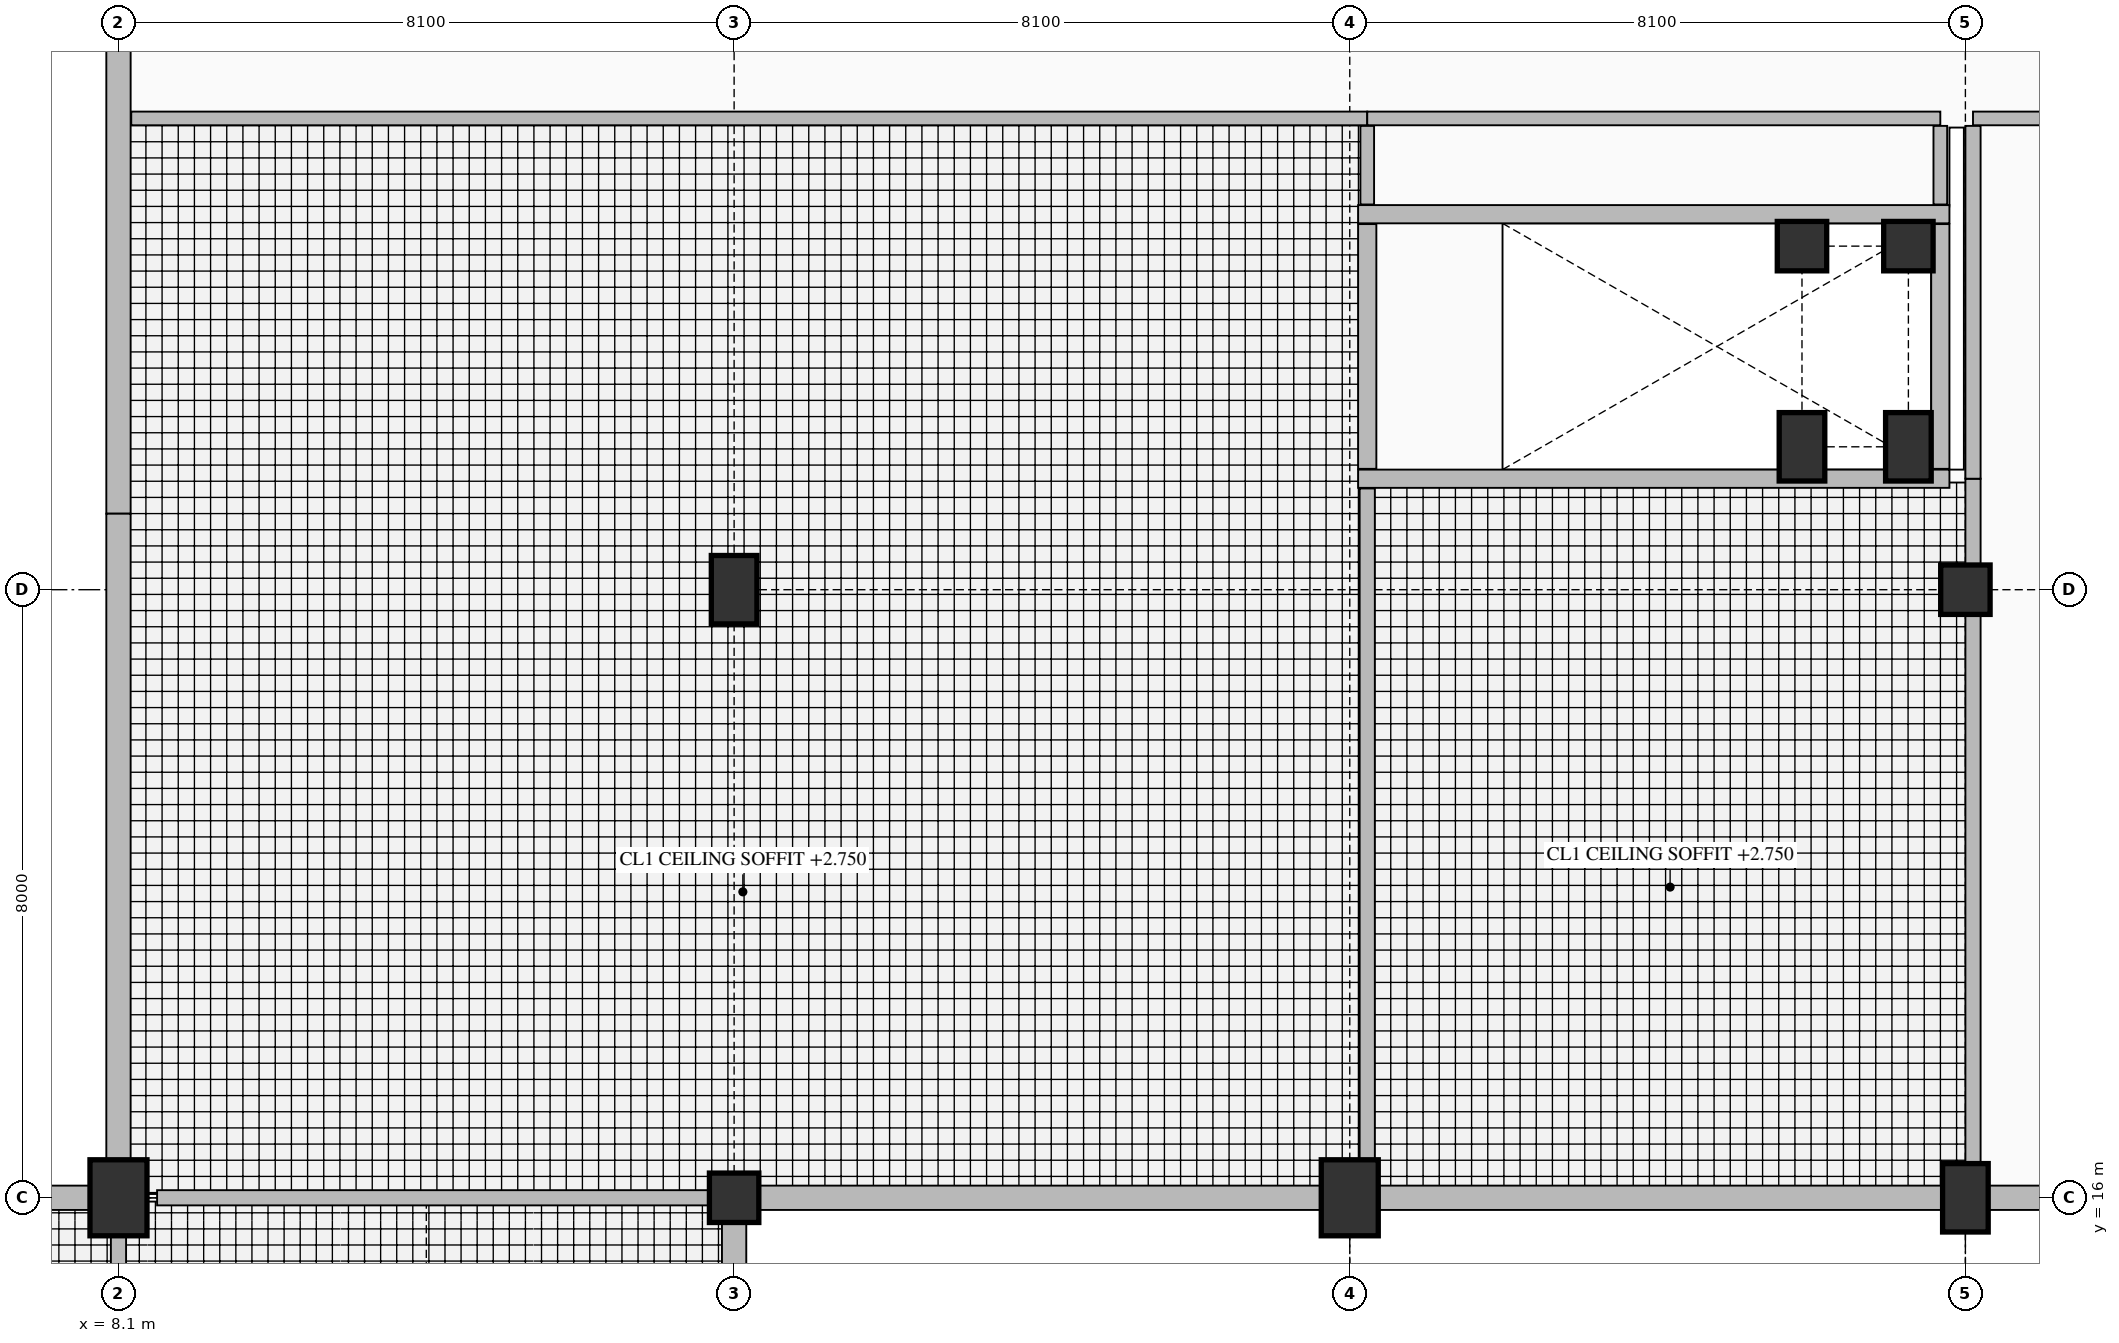
"""IFC4 building model, lengths in metres.
Left out: names, types, materials, properties, quantities, classifications, styles, units other than length and angle.
Written with IfcOpenShell. Run it as: python <this file> out.ifc"""

import sys

from ifc_helpers import new_model, si_unit, direction, frame, frame_2d, origin, origin_2d, place, context, subcontext, project, spatial, rectangle, extrude, element, fill, save


model = new_model("IFC4")
c1 = context("Model", 3, precision=1e-05, world=origin(), true_north=direction((0.0, 1.0)))
c2 = subcontext(c1, "Body", "Model", "MODEL_VIEW")
j1 = project(units=[si_unit("LENGTHUNIT", "METRE"), si_unit("PLANEANGLEUNIT", "RADIAN")], contexts=[c1])
p1 = place(None, origin())
s1 = spatial("IfcSite", under=j1, at=p1, CompositionType="ELEMENT")
p2 = place(p1, origin())
s2 = spatial("IfcBuilding", under=s1, at=p2, CompositionType="ELEMENT")
p3 = place(p2, origin())
s3 = spatial("IfcBuildingStorey", under=s2, at=p3, CompositionType="ELEMENT", Elevation=0.0)
p4 = place(p3, frame((8.1, 16.0, 0.0), z_axis=(0.0, 0.0, 1.0), x_axis=(1.0, 0.0, 0.0)))
e1 = element("IfcColumn", 1, at=p4, inside=s3, PredefinedType="COLUMN", context=c2, shape_type="SweptSolid", body=[
    extrude(rectangle(XDim=0.75, YDim=1.0, at=origin_2d()), origin(), (0.0, 0.0, 1.0), 5.4),
])
p5 = place(p3, frame((16.2, 16.0, 0.0), z_axis=(0.0, 0.0, 1.0), x_axis=(1.0, 0.0, 0.0)))
e2 = element("IfcColumn", 2, at=p5, inside=s3, PredefinedType="COLUMN", context=c2, shape_type="SweptSolid", body=[
    extrude(rectangle(XDim=0.65, YDim=0.65, at=origin_2d()), origin(), (0.0, 0.0, 1.0), 5.4),
])
p6 = place(p3, frame((16.2, 24.0, 0.0), z_axis=(0.0, 0.0, 1.0), x_axis=(1.0, 0.0, 0.0)))
e3 = element("IfcColumn", 3, at=p6, inside=s3, PredefinedType="COLUMN", context=c2, shape_type="SweptSolid", body=[
    extrude(rectangle(XDim=0.6, YDim=0.9, at=origin_2d()), origin(), (0.0, 0.0, 1.0), 5.4),
])
p7 = place(p3, frame((24.3, 16.0, 0.0), z_axis=(0.0, 0.0, 1.0), x_axis=(1.0, 0.0, 0.0)))
e4 = element("IfcColumn", 4, at=p7, inside=s3, PredefinedType="COLUMN", context=c2, shape_type="SweptSolid", body=[
    extrude(rectangle(XDim=0.75, YDim=1.0, at=origin_2d()), origin(), (0.0, 0.0, 1.0), 5.4),
])
p8 = place(p3, frame((30.25, 25.88, 0.0), z_axis=(0.0, 0.0, 1.0), x_axis=(1.0, 0.0, 0.0)))
e5 = element("IfcColumn", 5, at=p8, inside=s3, PredefinedType="COLUMN", context=c2, shape_type="SweptSolid", body=[
    extrude(rectangle(XDim=0.6, YDim=0.9, at=origin_2d()), origin(), (0.0, 0.0, 1.0), 5.4),
])
p9 = place(p3, frame((30.25, 28.52, 0.0), z_axis=(0.0, 0.0, 1.0), x_axis=(1.0, 0.0, 0.0)))
e6 = element("IfcColumn", 6, at=p9, inside=s3, PredefinedType="COLUMN", context=c2, shape_type="SweptSolid", body=[
    extrude(rectangle(XDim=0.65, YDim=0.65, at=origin_2d()), origin(), (0.0, 0.0, 1.0), 5.4),
])
p10 = place(p3, frame((31.65, 25.88, 0.0), z_axis=(0.0, 0.0, 1.0), x_axis=(1.0, 0.0, 0.0)))
e7 = element("IfcColumn", 7, at=p10, inside=s3, PredefinedType="COLUMN", context=c2, shape_type="SweptSolid", body=[
    extrude(rectangle(XDim=0.6, YDim=0.9, at=origin_2d()), origin(), (0.0, 0.0, 1.0), 5.4),
])
p11 = place(p3, frame((31.65, 28.52, 0.0), z_axis=(0.0, 0.0, 1.0), x_axis=(1.0, 0.0, 0.0)))
e8 = element("IfcColumn", 8, at=p11, inside=s3, PredefinedType="COLUMN", context=c2, shape_type="SweptSolid", body=[
    extrude(rectangle(XDim=0.65, YDim=0.65, at=origin_2d()), origin(), (0.0, 0.0, 1.0), 5.4),
])
p12 = place(p3, frame((32.4, 16.0, 0.0), z_axis=(0.0, 0.0, 1.0), x_axis=(1.0, 0.0, 0.0)))
e9 = element("IfcColumn", 9, at=p12, inside=s3, PredefinedType="COLUMN", context=c2, shape_type="SweptSolid", body=[
    extrude(rectangle(XDim=0.6, YDim=0.9, at=origin_2d()), origin(), (0.0, 0.0, 1.0), 5.4),
])
p13 = place(p3, frame((32.4, 24.0, 0.0), z_axis=(0.0, 0.0, 1.0), x_axis=(1.0, 0.0, 0.0)))
e10 = element("IfcColumn", 10, at=p13, inside=s3, PredefinedType="COLUMN", context=c2, shape_type="SweptSolid", body=[
    extrude(rectangle(XDim=0.65, YDim=0.65, at=origin_2d()), origin(), (0.0, 0.0, 1.0), 5.4),
])
p14 = place(p3, frame((16.2, 0.0, 0.0), z_axis=(0.0, 0.0, 1.0), x_axis=(0.0, 1.0, 0.0)))
e11 = element("IfcWall", 11, at=p14, inside=s3, PredefinedType="SOLIDWALL", context=c2, shape_type="SweptSolid", body=[
    extrude(rectangle(XDim=16.0, YDim=0.32, at=frame_2d((8.0, 0.0))), origin(), (0.0, 0.0, 1.0), 4.512),
])
p15 = place(p14, frame((3.38, 0.0, 0.0)))
e12 = element("IfcOpeningElement", 12, at=p15, cuts=e11, PredefinedType="OPENING", context=c2, shape_type="SweptSolid", body=[
    extrude(rectangle(XDim=2.2, YDim=2.6, at=frame_2d((1.1, 1.3))), frame((0.0, 0.17, 0.0), z_axis=(0.0, -1.0, 0.0), x_axis=(1.0, 0.0, 0.0)), (0.0, 0.0, 1.0), 0.34),
])
p16 = place(p3, frame((16.2, 16.0, 0.0), z_axis=(0.0, 0.0, 1.0), x_axis=(1.0, 0.0, 0.0)))
e13 = element("IfcWall", 13, at=p16, inside=s3, PredefinedType="SOLIDWALL", context=c2, shape_type="SweptSolid", body=[
    extrude(rectangle(XDim=16.2, YDim=0.32, at=frame_2d((8.1, 0.0))), origin(), (0.0, 0.0, 1.0), 4.412),
])
p17 = place(p16, frame((3.586, 0.0, 0.0)))
e14 = element("IfcOpeningElement", 14, at=p17, cuts=e13, PredefinedType="OPENING", context=c2, shape_type="SweptSolid", body=[
    extrude(rectangle(XDim=1.9, YDim=2.4, at=frame_2d((0.95, 1.2))), frame((0.0, 0.17, 0.0), z_axis=(0.0, -1.0, 0.0), x_axis=(1.0, 0.0, 0.0)), (0.0, 0.0, 1.0), 0.34),
])
p18 = place(p3, frame((32.4, 16.0, 0.0), z_axis=(0.0, 0.0, 1.0), x_axis=(1.0, 0.0, 0.0)))
e15 = element("IfcWall", 15, at=p18, inside=s3, PredefinedType="SOLIDWALL", context=c2, shape_type="SweptSolid", body=[
    extrude(rectangle(XDim=16.2, YDim=0.32, at=frame_2d((8.1, 0.0))), origin(), (0.0, 0.0, 1.0), 4.412),
])
p19 = place(p18, frame((3.436, 0.0, 0.0)))
e16 = element("IfcOpeningElement", 16, at=p19, cuts=e15, PredefinedType="OPENING", context=c2, shape_type="SweptSolid", body=[
    extrude(rectangle(XDim=2.2, YDim=2.6, at=frame_2d((1.1, 1.3))), frame((0.0, 0.17, 0.0), z_axis=(0.0, -1.0, 0.0), x_axis=(1.0, 0.0, 0.0)), (0.0, 0.0, 1.0), 0.34),
])
p20 = place(p3, frame((8.1, 34.0, 0.0), z_axis=(0.0, 0.0, 1.0), x_axis=(0.0, -1.0, 0.0)))
e17 = element("IfcWall", 17, at=p20, inside=s3, PredefinedType="SOLIDWALL", context=c2, shape_type="SweptSolid", body=[
    extrude(rectangle(XDim=9.0, YDim=0.32, at=frame_2d((4.5, 0.0))), origin(), (0.0, 0.0, 1.0), 3.912),
])
p21 = place(p20, frame((4.95, 0.0, 0.95)))
e18 = element("IfcOpeningElement", 18, at=p21, cuts=e17, PredefinedType="OPENING", context=c2, shape_type="SweptSolid", body=[
    extrude(rectangle(XDim=1.8, YDim=1.8, at=frame_2d((0.9, 0.9))), frame((0.0, 0.17, 0.0), z_axis=(0.0, -1.0, 0.0), x_axis=(1.0, 0.0, 0.0)), (0.0, 0.0, 1.0), 0.34),
])
p22 = place(p3, frame((8.1, 25.0, 0.0), z_axis=(0.0, 0.0, 1.0), x_axis=(0.0, -1.0, 0.0)))
e19 = element("IfcWall", 19, at=p22, inside=s3, PredefinedType="SOLIDWALL", context=c2, shape_type="SweptSolid", body=[
    extrude(rectangle(XDim=9.0, YDim=0.32, at=frame_2d((4.5, 0.0))), origin(), (0.0, 0.0, 1.0), 3.912),
])
p23 = place(p22, frame((3.6, 0.0, 0.85)))
e20 = element("IfcOpeningElement", 20, at=p23, cuts=e19, PredefinedType="OPENING", context=c2, shape_type="SweptSolid", body=[
    extrude(rectangle(XDim=1.8, YDim=2.1, at=frame_2d((0.9, 1.05))), frame((0.0, 0.17, 0.0), z_axis=(0.0, -1.0, 0.0), x_axis=(1.0, 0.0, 0.0)), (0.0, 0.0, 1.0), 0.34),
])
p24 = place(p3, frame((8.1, 16.0, 0.0), z_axis=(0.0, 0.0, 1.0), x_axis=(-1.0, 0.0, 0.0)))
e21 = element("IfcWall", 21, at=p24, inside=s3, PredefinedType="SOLIDWALL", context=c2, shape_type="SweptSolid", body=[
    extrude(rectangle(XDim=8.1, YDim=0.32, at=frame_2d((4.05, 0.0))), origin(), (0.0, 0.0, 1.0), 4.462),
])
p25 = place(p24, frame((3.15, 0.0, 0.85)))
e22 = element("IfcOpeningElement", 22, at=p25, cuts=e21, PredefinedType="OPENING", context=c2, shape_type="SweptSolid", body=[
    extrude(rectangle(XDim=1.8, YDim=2.4, at=frame_2d((0.9, 1.2))), frame((0.0, 0.17, 0.0), z_axis=(0.0, -1.0, 0.0), x_axis=(1.0, 0.0, 0.0)), (0.0, 0.0, 1.0), 0.34),
])
p26 = place(p3, frame((24.41, 25.46, 0.0), z_axis=(0.0, 0.0, 1.0), x_axis=(1.0, 0.0, 0.0)))
e23 = element("IfcWall", 23, at=p26, inside=s3, PredefinedType="PARTITIONING", context=c2, shape_type="SweptSolid", body=[
    extrude(rectangle(XDim=7.78, YDim=0.24, at=frame_2d((3.89, 0.0))), origin(), (0.0, 0.0, 1.0), 5.12),
])
p27 = place(p3, frame((24.41, 28.94, 0.0), z_axis=(0.0, 0.0, 1.0), x_axis=(1.0, 0.0, 0.0)))
e24 = element("IfcWall", 24, at=p27, inside=s3, PredefinedType="PARTITIONING", context=c2, shape_type="SweptSolid", body=[
    extrude(rectangle(XDim=7.78, YDim=0.24, at=frame_2d((3.89, 0.0))), origin(), (0.0, 0.0, 1.0), 5.12),
])
p28 = place(p27, frame((0.54, 0.0, 0.0)))
e25 = element("IfcOpeningElement", 25, at=p28, cuts=e24, PredefinedType="OPENING", context=c2, shape_type="SweptSolid", body=[
    extrude(rectangle(XDim=1.1, YDim=2.2, at=frame_2d((0.55, 1.1))), frame((0.0, 0.13, 0.0), z_axis=(0.0, -1.0, 0.0), x_axis=(1.0, 0.0, 0.0)), (0.0, 0.0, 1.0), 0.26),
])
p29 = place(p3, frame((24.53, 25.59, 0.0), z_axis=(0.0, 0.0, 1.0), x_axis=(0.0, 1.0, 0.0)))
e26 = element("IfcWall", 26, at=p29, inside=s3, PredefinedType="PARTITIONING", context=c2, shape_type="SweptSolid", body=[
    extrude(rectangle(XDim=3.22, YDim=0.24, at=frame_2d((1.61, 0.0))), origin(), (0.0, 0.0, 1.0), 3.912),
])
p30 = place(p3, frame((32.07, 25.59, 0.0), z_axis=(0.0, 0.0, 1.0), x_axis=(0.0, 1.0, 0.0)))
e27 = element("IfcWall", 27, at=p30, inside=s3, PredefinedType="PARTITIONING", context=c2, shape_type="SweptSolid", body=[
    extrude(rectangle(XDim=3.22, YDim=0.24, at=frame_2d((1.61, 0.0))), origin(), (0.0, 0.0, 1.0), 4.512),
])
p31 = place(p3, frame((8.608, 16.0, 0.0), z_axis=(0.0, 0.0, 1.0), x_axis=(1.0, 0.0, 0.0)))
e28 = element("IfcWall", 28, at=p31, inside=s3, PredefinedType="PARTITIONING", context=c2, shape_type="SweptSolid", body=[
    extrude(rectangle(XDim=7.259, YDim=0.2, at=frame_2d((3.629, 0.0))), origin(), (0.0, 0.0, 1.0), 4.412),
])
p32 = place(p31, frame((3.08, 0.0, 0.0)))
e29 = element("IfcOpeningElement", 29, at=p32, cuts=e28, PredefinedType="OPENING", context=c2, shape_type="SweptSolid", body=[
    extrude(rectangle(XDim=1.1, YDim=2.2, at=frame_2d((0.55, 1.1))), frame((0.0, 0.11, 0.0), z_axis=(0.0, -1.0, 0.0), x_axis=(1.0, 0.0, 0.0)), (0.0, 0.0, 1.0), 0.22),
])
p33 = place(p3, frame((8.268, 30.2, 0.0), z_axis=(0.0, 0.0, 1.0), x_axis=(1.0, 0.0, 0.0)))
e30 = element("IfcWall", 30, at=p33, inside=s3, PredefinedType="PARTITIONING", context=c2, shape_type="SweptSolid", body=[
    extrude(rectangle(XDim=16.262, YDim=0.18, at=frame_2d((8.131, 0.0))), origin(), (0.0, 0.0, 1.0), 5.12),
])
p34 = place(p33, frame((8.932, 0.0, 0.0)))
e31 = element("IfcOpeningElement", 31, at=p34, cuts=e30, PredefinedType="OPENING", context=c2, shape_type="SweptSolid", body=[
    extrude(rectangle(XDim=1.0, YDim=2.2, at=frame_2d((0.5, 1.1))), frame((0.0, 0.1, 0.0), z_axis=(0.0, -1.0, 0.0), x_axis=(1.0, 0.0, 0.0)), (0.0, 0.0, 1.0), 0.2),
])
p35 = place(p3, frame((24.53, 30.2, 0.0), z_axis=(0.0, 0.0, 1.0), x_axis=(1.0, 0.0, 0.0)))
e32 = element("IfcWall", 32, at=p35, inside=s3, PredefinedType="PARTITIONING", context=c2, shape_type="SweptSolid", body=[
    extrude(rectangle(XDim=7.54, YDim=0.18, at=frame_2d((3.77, 0.0))), origin(), (0.0, 0.0, 1.0), 5.12),
])
p36 = place(p35, frame((3.22, 0.0, 0.0)))
e33 = element("IfcOpeningElement", 33, at=p36, cuts=e32, PredefinedType="OPENING", context=c2, shape_type="SweptSolid", body=[
    extrude(rectangle(XDim=1.1, YDim=2.2, at=frame_2d((0.55, 1.1))), frame((0.0, 0.1, 0.0), z_axis=(0.0, -1.0, 0.0), x_axis=(1.0, 0.0, 0.0)), (0.0, 0.0, 1.0), 0.2),
])
p37 = place(p3, frame((32.5, 30.2, 0.0), z_axis=(0.0, 0.0, 1.0), x_axis=(1.0, 0.0, 0.0)))
e34 = element("IfcWall", 34, at=p37, inside=s3, PredefinedType="PARTITIONING", context=c2, shape_type="SweptSolid", body=[
    extrude(rectangle(XDim=23.3, YDim=0.18, at=frame_2d((11.65, 0.0))), origin(), (0.0, 0.0, 1.0), 5.12),
])
p38 = place(p37, frame((10.85, 0.0, 0.0)))
e35 = element("IfcOpeningElement", 35, at=p38, cuts=e34, PredefinedType="OPENING", context=c2, shape_type="SweptSolid", body=[
    extrude(rectangle(XDim=1.6, YDim=2.35, at=frame_2d((0.8, 1.175))), frame((0.0, 0.1, 0.0), z_axis=(0.0, -1.0, 0.0), x_axis=(1.0, 0.0, 0.0)), (0.0, 0.0, 1.0), 0.2),
])
p39 = place(p3, frame((8.1, 8.458, 0.0), z_axis=(0.0, 0.0, 1.0), x_axis=(0.0, 1.0, 0.0)))
e36 = element("IfcWall", 36, at=p39, inside=s3, PredefinedType="PARTITIONING", context=c2, shape_type="SweptSolid", body=[
    extrude(rectangle(XDim=7.034, YDim=0.2, at=frame_2d((3.517, 0.0))), origin(), (0.0, 0.0, 1.0), 4.695),
])
p40 = place(p3, frame((24.53, 16.508, 0.0), z_axis=(0.0, 0.0, 1.0), x_axis=(0.0, 1.0, 0.0)))
e37 = element("IfcWall", 37, at=p40, inside=s3, PredefinedType="PARTITIONING", context=c2, shape_type="SweptSolid", body=[
    extrude(rectangle(XDim=8.824, YDim=0.2, at=frame_2d((4.412, 0.0))), origin(), (0.0, 0.0, 1.0), 3.912),
])
p41 = place(p3, frame((24.53, 29.068, 0.0), z_axis=(0.0, 0.0, 1.0), x_axis=(0.0, 1.0, 0.0)))
e38 = element("IfcWall", 38, at=p41, inside=s3, PredefinedType="PARTITIONING", context=c2, shape_type="SweptSolid", body=[
    extrude(rectangle(XDim=1.034, YDim=0.18, at=frame_2d((0.517, 0.0))), origin(), (0.0, 0.0, 1.0), 3.912),
])
p42 = place(p3, frame((32.07, 29.068, 0.0), z_axis=(0.0, 0.0, 1.0), x_axis=(0.0, 1.0, 0.0)))
e39 = element("IfcWall", 39, at=p42, inside=s3, PredefinedType="PARTITIONING", context=c2, shape_type="SweptSolid", body=[
    extrude(rectangle(XDim=1.034, YDim=0.18, at=frame_2d((0.517, 0.0))), origin(), (0.0, 0.0, 1.0), 4.512),
])
p43 = place(p3, frame((32.5, 16.458, 0.0), z_axis=(0.0, 0.0, 1.0), x_axis=(0.0, 1.0, 0.0)))
e40 = element("IfcWall", 40, at=p43, inside=s3, PredefinedType="PARTITIONING", context=c2, shape_type="SweptSolid", body=[
    extrude(rectangle(XDim=7.209, YDim=0.2, at=frame_2d((3.604, 0.0))), origin(), (0.0, 0.0, 1.0), 4.695),
])
p44 = place(p43, frame((3.054, 0.0, 0.0)))
e41 = element("IfcOpeningElement", 41, at=p44, cuts=e40, PredefinedType="OPENING", context=c2, shape_type="SweptSolid", body=[
    extrude(rectangle(XDim=1.1, YDim=2.2, at=frame_2d((0.55, 1.1))), frame((0.0, 0.11, 0.0), z_axis=(0.0, -1.0, 0.0), x_axis=(1.0, 0.0, 0.0)), (0.0, 0.0, 1.0), 0.22),
])
p45 = place(p3, frame((32.5, 24.333, 0.0), z_axis=(0.0, 0.0, 1.0), x_axis=(0.0, 1.0, 0.0)))
e42 = element("IfcWall", 42, at=p45, inside=s3, PredefinedType="PARTITIONING", context=c2, shape_type="SweptSolid", body=[
    extrude(rectangle(XDim=1.127, YDim=0.2, at=frame_2d((0.563, 0.0))), origin(), (0.0, 0.0, 1.0), 4.512),
])
p46 = place(p3, frame((32.5, 25.46, 0.0), z_axis=(0.0, 0.0, 1.0), x_axis=(0.0, 1.0, 0.0)))
e43 = element("IfcWall", 43, at=p46, inside=s3, PredefinedType="PARTITIONING", context=c2, shape_type="SweptSolid", body=[
    extrude(rectangle(XDim=4.642, YDim=0.2, at=frame_2d((2.321, 0.0))), origin(), (0.0, 0.0, 1.0), 4.512),
])
p47 = place(p17, frame((1.9, 0.0, 0.0), z_axis=(0.0, 0.0, 1.0), x_axis=(-1.0, 0.0, 0.0)))
e44 = element("IfcDoor", 44, at=p47, inside=s3, OperationType="DOUBLE_DOOR_SINGLE_SWING", PredefinedType="DOOR", context=c2, shape_type="SweptSolid", body=[
    extrude(rectangle(XDim=1.9, YDim=2.4, at=frame_2d((0.95, 1.2))), frame((0.0, 0.025, 0.0), z_axis=(0.0, -1.0, 0.0), x_axis=(1.0, 0.0, 0.0)), (0.0, 0.0, 1.0), 0.05),
])
fill(e14, e44)
p48 = place(p21, origin())
e45 = element("IfcWindow", 45, at=p48, inside=s3, PartitioningType="DOUBLE_PANEL_VERTICAL", PredefinedType="WINDOW", context=c2, shape_type="SweptSolid", body=[
    extrude(rectangle(XDim=1.8, YDim=1.8, at=frame_2d((0.9, 0.9))), frame((0.0, 0.03, 0.0), z_axis=(0.0, -1.0, 0.0), x_axis=(1.0, 0.0, 0.0)), (0.0, 0.0, 1.0), 0.06),
])
fill(e18, e45)
p49 = place(p23, origin())
e46 = element("IfcWindow", 46, at=p49, inside=s3, PartitioningType="DOUBLE_PANEL_VERTICAL", PredefinedType="WINDOW", context=c2, shape_type="SweptSolid", body=[
    extrude(rectangle(XDim=1.8, YDim=2.1, at=frame_2d((0.9, 1.05))), frame((0.0, 0.03, 0.0), z_axis=(0.0, -1.0, 0.0), x_axis=(1.0, 0.0, 0.0)), (0.0, 0.0, 1.0), 0.06),
])
fill(e20, e46)
p50 = place(p28, origin())
e47 = element("IfcDoor", 47, at=p50, inside=s3, OperationType="SINGLE_SWING_RIGHT", PredefinedType="DOOR", context=c2, shape_type="SweptSolid", body=[
    extrude(rectangle(XDim=1.1, YDim=2.2, at=frame_2d((0.55, 1.1))), frame((0.0, 0.025, 0.0), z_axis=(0.0, -1.0, 0.0), x_axis=(1.0, 0.0, 0.0)), (0.0, 0.0, 1.0), 0.05),
])
fill(e25, e47)
p51 = place(p32, frame((1.1, 0.0, 0.0), z_axis=(0.0, 0.0, 1.0), x_axis=(-1.0, 0.0, 0.0)))
e48 = element("IfcDoor", 48, at=p51, inside=s3, OperationType="SINGLE_SWING_LEFT", PredefinedType="DOOR", context=c2, shape_type="SweptSolid", body=[
    extrude(rectangle(XDim=1.1, YDim=2.2, at=frame_2d((0.55, 1.1))), frame((0.0, 0.025, 0.0), z_axis=(0.0, -1.0, 0.0), x_axis=(1.0, 0.0, 0.0)), (0.0, 0.0, 1.0), 0.05),
])
fill(e29, e48)
p52 = place(p34, frame((1.0, 0.0, 0.0), z_axis=(0.0, 0.0, 1.0), x_axis=(-1.0, 0.0, 0.0)))
e49 = element("IfcDoor", 49, at=p52, inside=s3, OperationType="SINGLE_SWING_RIGHT", PredefinedType="DOOR", context=c2, shape_type="SweptSolid", body=[
    extrude(rectangle(XDim=1.0, YDim=2.2, at=frame_2d((0.5, 1.1))), frame((0.0, 0.025, 0.0), z_axis=(0.0, -1.0, 0.0), x_axis=(1.0, 0.0, 0.0)), (0.0, 0.0, 1.0), 0.05),
])
fill(e31, e49)
p53 = place(p36, origin())
e50 = element("IfcDoor", 50, at=p53, inside=s3, OperationType="SINGLE_SWING_LEFT", PredefinedType="DOOR", context=c2, shape_type="SweptSolid", body=[
    extrude(rectangle(XDim=1.1, YDim=2.2, at=frame_2d((0.55, 1.1))), frame((0.0, 0.025, 0.0), z_axis=(0.0, -1.0, 0.0), x_axis=(1.0, 0.0, 0.0)), (0.0, 0.0, 1.0), 0.05),
])
fill(e33, e50)
p54 = place(p44, origin())
e51 = element("IfcDoor", 51, at=p54, inside=s3, OperationType="SINGLE_SWING_RIGHT", PredefinedType="DOOR", context=c2, shape_type="SweptSolid", body=[
    extrude(rectangle(XDim=1.1, YDim=2.2, at=frame_2d((0.55, 1.1))), frame((0.0, 0.025, 0.0), z_axis=(0.0, -1.0, 0.0), x_axis=(1.0, 0.0, 0.0)), (0.0, 0.0, 1.0), 0.05),
])
fill(e41, e51)
save(model, sys.argv[1])
